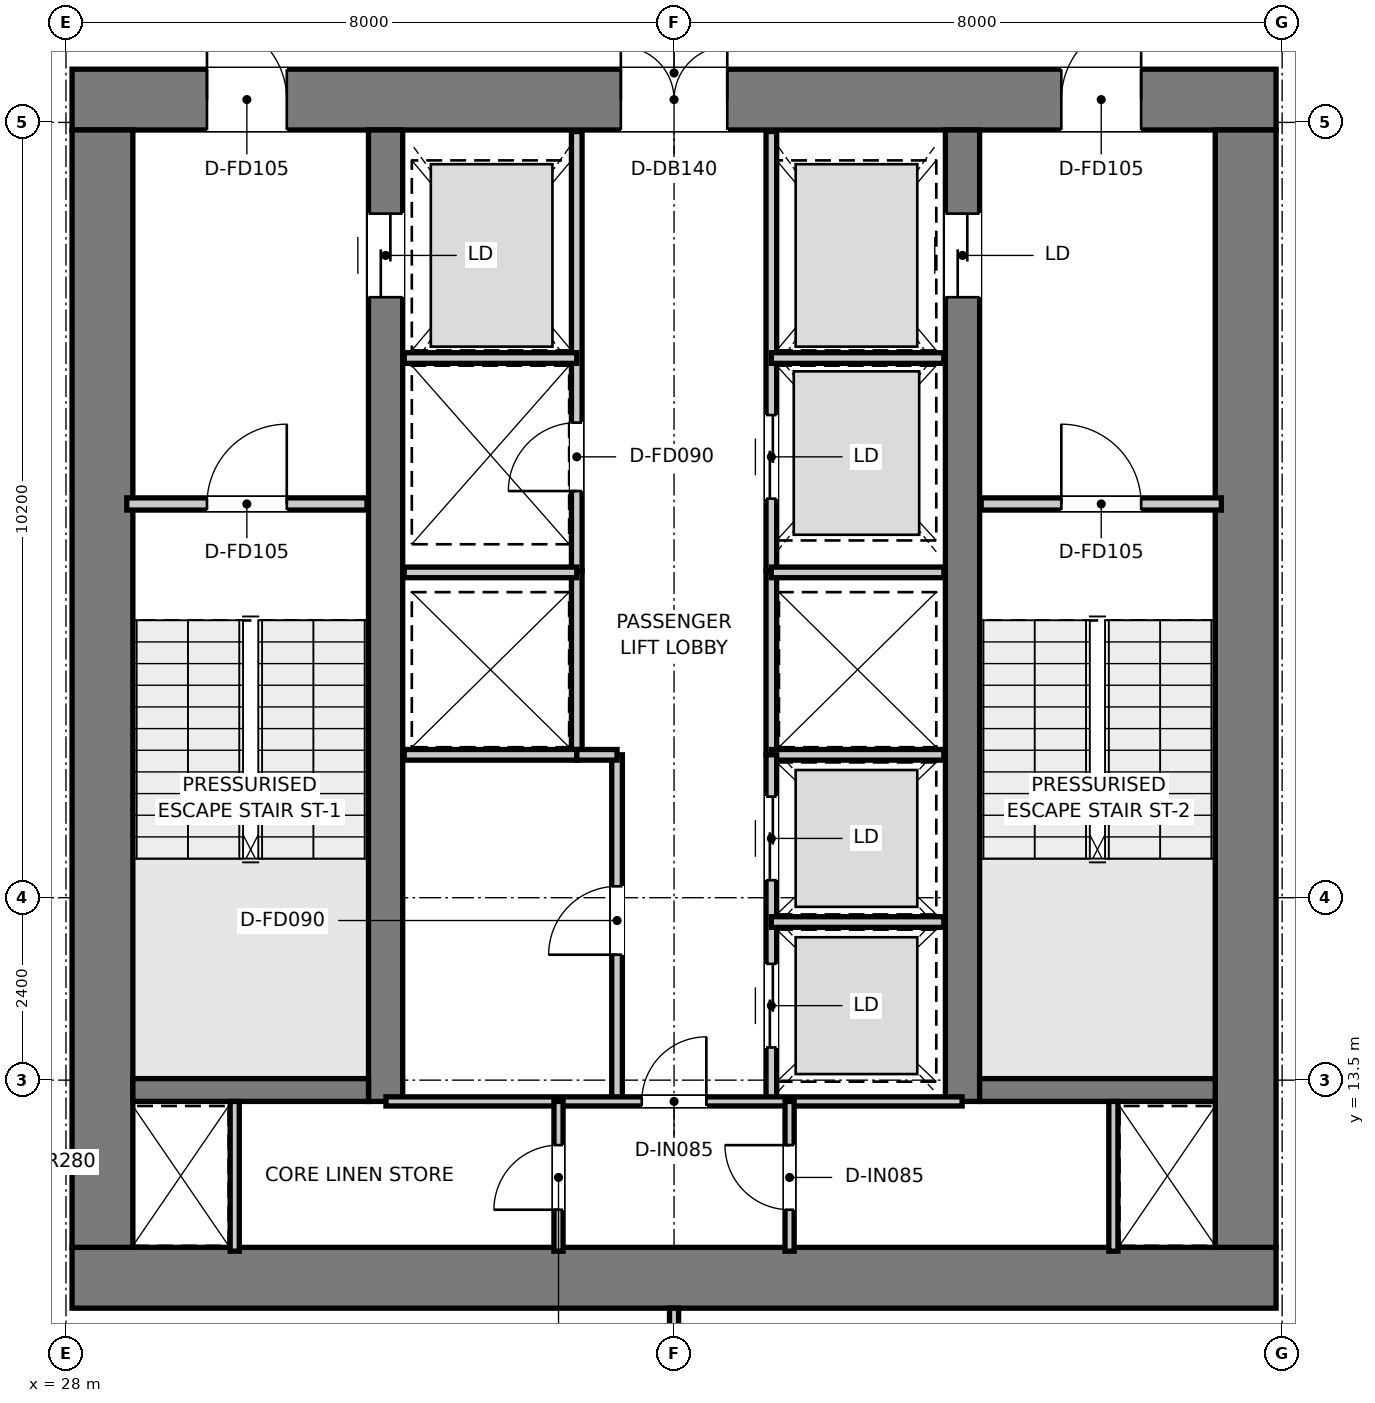
"""IFC4 building model, lengths in metres.
Left out: names, types, materials, properties, quantities, classifications, styles, units other than length and angle.
Written with IfcOpenShell. Run it as: python <this file> out.ifc"""

import sys

from ifc_helpers import new_model, si_unit, direction, frame, frame_2d, origin, place, context, subcontext, project, spatial, rectangle, extrude, element, fill, save


model = new_model("IFC4")
c1 = context("Model", 3, precision=1e-05, world=origin(), true_north=direction((0.0, 1.0)))
c2 = subcontext(c1, "Body", "Model", "MODEL_VIEW")
j1 = project(units=[si_unit("LENGTHUNIT", "METRE"), si_unit("PLANEANGLEUNIT", "RADIAN")], contexts=[c1])
p1 = place(None, origin())
s1 = spatial("IfcSite", under=j1, at=p1, CompositionType="ELEMENT")
p2 = place(p1, origin())
s2 = spatial("IfcBuilding", under=s1, at=p2, CompositionType="ELEMENT")
p3 = place(p2, frame((0.0, 0.0, 238.9)))
s3 = spatial("IfcBuildingStorey", under=s2, at=p3, CompositionType="ELEMENT", Elevation=238.9)
p4 = place(p3, frame((28.08, 10.9, 0.0), z_axis=(0.0, 0.0, 1.0), x_axis=(1.0, 0.0, 0.0)))
e1 = element("IfcWall", 1, at=p4, inside=s3, PredefinedType="SHEAR", context=c2, shape_type="SweptSolid", body=[
    extrude(rectangle(XDim=15.84, YDim=0.8, at=frame_2d((7.92, 0.0))), origin(), (0.0, 0.0, 1.0), 3.95),
])
p5 = place(p3, frame((28.08, 26.4, 0.0), z_axis=(0.0, 0.0, 1.0), x_axis=(1.0, 0.0, 0.0)))
e2 = element("IfcWall", 2, at=p5, inside=s3, PredefinedType="SHEAR", context=c2, shape_type="SweptSolid", body=[
    extrude(rectangle(XDim=15.84, YDim=0.8, at=frame_2d((7.92, 0.0))), origin(), (0.0, 0.0, 1.0), 3.95),
])
p6 = place(p5, frame((7.22, 0.0, 0.0)))
e3 = element("IfcOpeningElement", 3, at=p6, cuts=e2, PredefinedType="OPENING", context=c2, shape_type="SweptSolid", body=[
    extrude(rectangle(XDim=1.4, YDim=2.2, at=frame_2d((0.7, 1.1))), frame((0.0, 0.41, 0.0), z_axis=(0.0, -1.0, 0.0), x_axis=(1.0, 0.0, 0.0)), (0.0, 0.0, 1.0), 0.82),
])
p7 = place(p5, frame((1.775, 0.0, 0.0)))
e4 = element("IfcOpeningElement", 4, at=p7, cuts=e2, PredefinedType="OPENING", context=c2, shape_type="SweptSolid", body=[
    extrude(rectangle(XDim=1.05, YDim=2.1, at=frame_2d((0.525, 1.05))), frame((0.0, 0.41, 0.0), z_axis=(0.0, -1.0, 0.0), x_axis=(1.0, 0.0, 0.0)), (0.0, 0.0, 1.0), 0.82),
])
p8 = place(p5, frame((13.015, 0.0, 0.0)))
e5 = element("IfcOpeningElement", 5, at=p8, cuts=e2, PredefinedType="OPENING", context=c2, shape_type="SweptSolid", body=[
    extrude(rectangle(XDim=1.05, YDim=2.1, at=frame_2d((0.525, 1.05))), frame((0.0, 0.41, 0.0), z_axis=(0.0, -1.0, 0.0), x_axis=(1.0, 0.0, 0.0)), (0.0, 0.0, 1.0), 0.82),
])
for number, where, z_axis, x_axis in (
    (6, (28.48, 11.3, 0.0), (0.0, 0.0, 1.0), (0.0, 1.0, 0.0)),
    (7, (43.52, 11.3, 0.0), (0.0, 0.0, 1.0), (0.0, 1.0, 0.0)),
):
    element("IfcWall", number, at=place(p3, frame(where, z_axis=z_axis, x_axis=x_axis)), inside=s3, PredefinedType="SHEAR", context=c2, shape_type="SweptSolid", body=[
        extrude(rectangle(XDim=14.7, YDim=0.8, at=frame_2d((7.35, 0.0))), origin(), (0.0, 0.0, 1.0), 3.95),
    ])
p9 = place(p3, frame((32.205, 13.22, 0.0), z_axis=(0.0, 0.0, 1.0), x_axis=(0.0, 1.0, 0.0)))
e8 = element("IfcWall", 8, at=p9, inside=s3, PredefinedType="SHEAR", context=c2, shape_type="SweptSolid", body=[
    extrude(rectangle(XDim=12.78, YDim=0.45, at=frame_2d((6.39, 0.0))), origin(), (0.0, 0.0, 1.0), 3.95),
])
p10 = place(p9, frame((10.58, 0.0, 0.0)))
e9 = element("IfcOpeningElement", 9, at=p10, cuts=e8, PredefinedType="OPENING", context=c2, shape_type="SweptSolid", body=[
    extrude(rectangle(XDim=1.1, YDim=2.15, at=frame_2d((0.55, 1.075))), frame((0.0, 0.235, 0.0), z_axis=(0.0, -1.0, 0.0), x_axis=(1.0, 0.0, 0.0)), (0.0, 0.0, 1.0), 0.47),
])
p11 = place(p3, frame((39.795, 13.22, 0.0), z_axis=(0.0, 0.0, 1.0), x_axis=(0.0, 1.0, 0.0)))
e10 = element("IfcWall", 10, at=p11, inside=s3, PredefinedType="SHEAR", context=c2, shape_type="SweptSolid", body=[
    extrude(rectangle(XDim=12.78, YDim=0.45, at=frame_2d((6.39, 0.0))), origin(), (0.0, 0.0, 1.0), 3.95),
])
p12 = place(p11, frame((10.58, 0.0, 0.0)))
e11 = element("IfcOpeningElement", 11, at=p12, cuts=e10, PredefinedType="OPENING", context=c2, shape_type="SweptSolid", body=[
    extrude(rectangle(XDim=1.1, YDim=2.15, at=frame_2d((0.55, 1.075))), frame((0.0, 0.235, 0.0), z_axis=(0.0, -1.0, 0.0), x_axis=(1.0, 0.0, 0.0)), (0.0, 0.0, 1.0), 0.47),
])
for number, where, z_axis, x_axis in (
    (12, (28.88, 13.37, 0.0), (0.0, 0.0, 1.0), (1.0, 0.0, 0.0)),
    (13, (40.02, 13.37, 0.0), (0.0, 0.0, 1.0), (1.0, 0.0, 0.0)),
):
    element("IfcWall", number, at=place(p3, frame(where, z_axis=z_axis, x_axis=x_axis)), inside=s3, PredefinedType="SHEAR", context=c2, shape_type="SweptSolid", body=[
        extrude(rectangle(XDim=3.1, YDim=0.3, at=frame_2d((1.55, 0.0))), origin(), (0.0, 0.0, 1.0), 3.95),
    ])
p13 = place(p3, frame((28.8, 21.08, 0.0), z_axis=(0.0, 0.0, 1.0), x_axis=(1.0, 0.0, 0.0)))
e14 = element("IfcWall", 14, at=p13, inside=s3, PredefinedType="PARTITIONING", context=c2, shape_type="SweptSolid", body=[
    extrude(rectangle(XDim=3.16, YDim=0.16, at=frame_2d((1.58, 0.0))), origin(), (0.0, 0.0, 1.0), 3.67),
])
p14 = place(p13, frame((1.055, 0.0, 0.0)))
e15 = element("IfcOpeningElement", 15, at=p14, cuts=e14, PredefinedType="OPENING", context=c2, shape_type="SweptSolid", body=[
    extrude(rectangle(XDim=1.05, YDim=2.1, at=frame_2d((0.525, 1.05))), frame((0.0, 0.09, 0.0), z_axis=(0.0, -1.0, 0.0), x_axis=(1.0, 0.0, 0.0)), (0.0, 0.0, 1.0), 0.18),
])
p15 = place(p3, frame((40.04, 21.08, 0.0), z_axis=(0.0, 0.0, 1.0), x_axis=(1.0, 0.0, 0.0)))
e16 = element("IfcWall", 16, at=p15, inside=s3, PredefinedType="PARTITIONING", context=c2, shape_type="SweptSolid", body=[
    extrude(rectangle(XDim=3.16, YDim=0.16, at=frame_2d((1.58, 0.0))), origin(), (0.0, 0.0, 1.0), 3.67),
])
p16 = place(p15, frame((1.055, 0.0, 0.0)))
e17 = element("IfcOpeningElement", 17, at=p16, cuts=e16, PredefinedType="OPENING", context=c2, shape_type="SweptSolid", body=[
    extrude(rectangle(XDim=1.05, YDim=2.1, at=frame_2d((0.525, 1.05))), frame((0.0, 0.09, 0.0), z_axis=(0.0, -1.0, 0.0), x_axis=(1.0, 0.0, 0.0)), (0.0, 0.0, 1.0), 0.18),
])
p17 = place(p3, frame((34.72, 20.2, 0.0), z_axis=(0.0, 0.0, 1.0), x_axis=(0.0, 1.0, 0.0)))
e18 = element("IfcWall", 18, at=p17, inside=s3, PredefinedType="PARTITIONING", context=c2, shape_type="SweptSolid", body=[
    extrude(rectangle(XDim=5.78, YDim=0.14, at=frame_2d((2.89, 0.0))), origin(), (0.0, 0.0, 1.0), 2.67),
])
p18 = place(p17, frame((1.05, 0.0, 0.0)))
e19 = element("IfcOpeningElement", 19, at=p18, cuts=e18, PredefinedType="OPENING", context=c2, shape_type="SweptSolid", body=[
    extrude(rectangle(XDim=0.9, YDim=2.1, at=frame_2d((0.45, 1.05))), frame((0.0, 0.08, 0.0), z_axis=(0.0, -1.0, 0.0), x_axis=(1.0, 0.0, 0.0)), (0.0, 0.0, 1.0), 0.16),
])
p19 = place(p3, frame((37.28, 20.2, 0.0), z_axis=(0.0, 0.0, 1.0), x_axis=(0.0, 1.0, 0.0)))
e20 = element("IfcWall", 20, at=p19, inside=s3, PredefinedType="PARTITIONING", context=c2, shape_type="SweptSolid", body=[
    extrude(rectangle(XDim=5.78, YDim=0.14, at=frame_2d((2.89, 0.0))), origin(), (0.0, 0.0, 1.0), 2.67),
])
p20 = place(p19, frame((0.95, 0.0, 0.0)))
e21 = element("IfcOpeningElement", 21, at=p20, cuts=e20, PredefinedType="OPENING", context=c2, shape_type="SweptSolid", body=[
    extrude(rectangle(XDim=1.1, YDim=2.15, at=frame_2d((0.55, 1.075))), frame((0.0, 0.08, 0.0), z_axis=(0.0, -1.0, 0.0), x_axis=(1.0, 0.0, 0.0)), (0.0, 0.0, 1.0), 0.16),
])
for number, where, z_axis, x_axis in (
    (22, (32.45, 23.0, 0.0), (0.0, 0.0, 1.0), (1.0, 0.0, 0.0)),
    (23, (37.28, 23.0, 0.0), (0.0, 0.0, 1.0), (1.0, 0.0, 0.0)),
):
    element("IfcWall", number, at=place(p3, frame(where, z_axis=z_axis, x_axis=x_axis)), inside=s3, PredefinedType="PARTITIONING", context=c2, shape_type="SweptSolid", body=[
        extrude(rectangle(XDim=2.27, YDim=0.14, at=frame_2d((1.135, 0.0))), origin(), (0.0, 0.0, 1.0), 2.67),
    ])
for number, where, z_axis, x_axis in (
    (24, (34.72, 17.78, 0.0), (0.0, 0.0, 1.0), (0.0, 1.0, 0.0)),
    (25, (37.28, 17.78, 0.0), (0.0, 0.0, 1.0), (0.0, 1.0, 0.0)),
):
    element("IfcWall", number, at=place(p3, frame(where, z_axis=z_axis, x_axis=x_axis)), inside=s3, PredefinedType="PARTITIONING", context=c2, shape_type="SweptSolid", body=[
        extrude(rectangle(XDim=2.42, YDim=0.14, at=frame_2d((1.21, 0.0))), origin(), (0.0, 0.0, 1.0), 3.67),
    ])
for number, where, z_axis, x_axis in (
    (26, (32.45, 17.78, 0.0), (0.0, 0.0, 1.0), (1.0, 0.0, 0.0)),
    (27, (32.45, 20.18, 0.0), (0.0, 0.0, 1.0), (1.0, 0.0, 0.0)),
    (28, (37.28, 17.78, 0.0), (0.0, 0.0, 1.0), (1.0, 0.0, 0.0)),
    (29, (37.28, 20.18, 0.0), (0.0, 0.0, 1.0), (1.0, 0.0, 0.0)),
):
    element("IfcWall", number, at=place(p3, frame(where, z_axis=z_axis, x_axis=x_axis)), inside=s3, PredefinedType="PARTITIONING", context=c2, shape_type="SweptSolid", body=[
        extrude(rectangle(XDim=2.27, YDim=0.14, at=frame_2d((1.135, 0.0))), origin(), (0.0, 0.0, 1.0), 3.67),
    ])
p21 = place(p3, frame((35.25, 13.22, 0.0), z_axis=(0.0, 0.0, 1.0), x_axis=(0.0, 1.0, 0.0)))
e30 = element("IfcWall", 30, at=p21, inside=s3, PredefinedType="PARTITIONING", context=c2, shape_type="SweptSolid", body=[
    extrude(rectangle(XDim=4.56, YDim=0.14, at=frame_2d((2.28, 0.0))), origin(), (0.0, 0.0, 1.0), 3.67),
])
p22 = place(p21, frame((1.93, 0.0, 0.0)))
e31 = element("IfcOpeningElement", 31, at=p22, cuts=e30, PredefinedType="OPENING", context=c2, shape_type="SweptSolid", body=[
    extrude(rectangle(XDim=0.9, YDim=2.1, at=frame_2d((0.45, 1.05))), frame((0.0, 0.08, 0.0), z_axis=(0.0, -1.0, 0.0), x_axis=(1.0, 0.0, 0.0)), (0.0, 0.0, 1.0), 0.16),
])
p23 = place(p3, frame((34.72, 17.78, 0.0), z_axis=(0.0, 0.0, 1.0), x_axis=(1.0, 0.0, 0.0)))
e32 = element("IfcWall", 32, at=p23, inside=s3, PredefinedType="PARTITIONING", context=c2, shape_type="SweptSolid", body=[
    extrude(rectangle(XDim=0.53, YDim=0.14, at=frame_2d((0.265, 0.0))), origin(), (0.0, 0.0, 1.0), 3.67),
])
p24 = place(p3, frame((37.28, 13.22, 0.0), z_axis=(0.0, 0.0, 1.0), x_axis=(0.0, 1.0, 0.0)))
e33 = element("IfcWall", 33, at=p24, inside=s3, PredefinedType="PARTITIONING", context=c2, shape_type="SweptSolid", body=[
    extrude(rectangle(XDim=4.56, YDim=0.14, at=frame_2d((2.28, 0.0))), origin(), (0.0, 0.0, 1.0), 3.67),
])
p25 = place(p24, frame((0.71, 0.0, 0.0)))
e34 = element("IfcOpeningElement", 34, at=p25, cuts=e33, PredefinedType="OPENING", context=c2, shape_type="SweptSolid", body=[
    extrude(rectangle(XDim=1.1, YDim=2.15, at=frame_2d((0.55, 1.075))), frame((0.0, 0.08, 0.0), z_axis=(0.0, -1.0, 0.0), x_axis=(1.0, 0.0, 0.0)), (0.0, 0.0, 1.0), 0.16),
])
p26 = place(p24, frame((2.91, 0.0, 0.0)))
e35 = element("IfcOpeningElement", 35, at=p26, cuts=e33, PredefinedType="OPENING", context=c2, shape_type="SweptSolid", body=[
    extrude(rectangle(XDim=1.1, YDim=2.15, at=frame_2d((0.55, 1.075))), frame((0.0, 0.08, 0.0), z_axis=(0.0, -1.0, 0.0), x_axis=(1.0, 0.0, 0.0)), (0.0, 0.0, 1.0), 0.16),
])
p27 = place(p3, frame((37.28, 15.58, 0.0), z_axis=(0.0, 0.0, 1.0), x_axis=(1.0, 0.0, 0.0)))
e36 = element("IfcWall", 36, at=p27, inside=s3, PredefinedType="PARTITIONING", context=c2, shape_type="SweptSolid", body=[
    extrude(rectangle(XDim=2.27, YDim=0.14, at=frame_2d((1.135, 0.0))), origin(), (0.0, 0.0, 1.0), 3.67),
])
for number, where, z_axis, x_axis in (
    (37, (30.22, 11.25, 0.0), (0.0, 0.0, 1.0), (0.0, 1.0, 0.0)),
    (38, (41.78, 11.25, 0.0), (0.0, 0.0, 1.0), (0.0, 1.0, 0.0)),
):
    element("IfcWall", number, at=place(p3, frame(where, z_axis=z_axis, x_axis=x_axis)), inside=s3, PredefinedType="PARTITIONING", context=c2, shape_type="SweptSolid", body=[
        extrude(rectangle(XDim=1.97, YDim=0.12, at=frame_2d((0.985, 0.0))), origin(), (0.0, 0.0, 1.0), 3.67),
    ])
p28 = place(p3, frame((32.21, 13.22, 0.0), z_axis=(0.0, 0.0, 1.0), x_axis=(1.0, 0.0, 0.0)))
e39 = element("IfcWall", 39, at=p28, inside=s3, PredefinedType="PARTITIONING", context=c2, shape_type="SweptSolid", body=[
    extrude(rectangle(XDim=7.58, YDim=0.12, at=frame_2d((3.79, 0.0))), origin(), (0.0, 0.0, 1.0), 3.67),
])
p29 = place(p28, frame((3.365, 0.0, 0.0)))
e40 = element("IfcOpeningElement", 40, at=p29, cuts=e39, PredefinedType="OPENING", context=c2, shape_type="SweptSolid", body=[
    extrude(rectangle(XDim=0.85, YDim=2.1, at=frame_2d((0.425, 1.05))), frame((0.0, 0.07, 0.0), z_axis=(0.0, -1.0, 0.0), x_axis=(1.0, 0.0, 0.0)), (0.0, 0.0, 1.0), 0.14),
])
p30 = place(p3, frame((34.48, 11.25, 0.0), z_axis=(0.0, 0.0, 1.0), x_axis=(0.0, 1.0, 0.0)))
e41 = element("IfcWall", 41, at=p30, inside=s3, PredefinedType="PARTITIONING", context=c2, shape_type="SweptSolid", body=[
    extrude(rectangle(XDim=1.97, YDim=0.12, at=frame_2d((0.985, 0.0))), origin(), (0.0, 0.0, 1.0), 3.67),
])
p31 = place(p30, frame((0.545, 0.0, 0.0)))
e42 = element("IfcOpeningElement", 42, at=p31, cuts=e41, PredefinedType="OPENING", context=c2, shape_type="SweptSolid", body=[
    extrude(rectangle(XDim=0.85, YDim=2.1, at=frame_2d((0.425, 1.05))), frame((0.0, 0.07, 0.0), z_axis=(0.0, -1.0, 0.0), x_axis=(1.0, 0.0, 0.0)), (0.0, 0.0, 1.0), 0.14),
])
p32 = place(p3, frame((37.52, 11.25, 0.0), z_axis=(0.0, 0.0, 1.0), x_axis=(0.0, 1.0, 0.0)))
e43 = element("IfcWall", 43, at=p32, inside=s3, PredefinedType="PARTITIONING", context=c2, shape_type="SweptSolid", body=[
    extrude(rectangle(XDim=1.97, YDim=0.12, at=frame_2d((0.985, 0.0))), origin(), (0.0, 0.0, 1.0), 3.67),
])
p33 = place(p32, frame((0.545, 0.0, 0.0)))
e44 = element("IfcOpeningElement", 44, at=p33, cuts=e43, PredefinedType="OPENING", context=c2, shape_type="SweptSolid", body=[
    extrude(rectangle(XDim=0.85, YDim=2.1, at=frame_2d((0.425, 1.05))), frame((0.0, 0.07, 0.0), z_axis=(0.0, -1.0, 0.0), x_axis=(1.0, 0.0, 0.0)), (0.0, 0.0, 1.0), 0.14),
])
p34 = place(p3, frame((36.0, 4.407, 0.0), z_axis=(0.0, 0.0, 1.0), x_axis=(0.0, 1.0, 0.0)))
e45 = element("IfcWall", 45, at=p34, inside=s3, PredefinedType="PARTITIONING", context=c2, shape_type="SweptSolid", body=[
    extrude(rectangle(XDim=6.093, YDim=0.12, at=frame_2d((3.047, 0.0))), origin(), (0.0, 0.0, 1.0), 3.67),
])
p35 = place(p14, origin())
e46 = element("IfcDoor", 46, at=p35, inside=s3, OperationType="SINGLE_SWING_RIGHT", PredefinedType="DOOR", context=c2, shape_type="SweptSolid", body=[
    extrude(rectangle(XDim=1.05, YDim=2.1, at=frame_2d((0.525, 1.05))), frame((0.0, 0.025, 0.0), z_axis=(0.0, -1.0, 0.0), x_axis=(1.0, 0.0, 0.0)), (0.0, 0.0, 1.0), 0.05),
])
fill(e15, e46)
p36 = place(p16, origin())
e47 = element("IfcDoor", 47, at=p36, inside=s3, OperationType="SINGLE_SWING_LEFT", PredefinedType="DOOR", context=c2, shape_type="SweptSolid", body=[
    extrude(rectangle(XDim=1.05, YDim=2.1, at=frame_2d((0.525, 1.05))), frame((0.0, 0.025, 0.0), z_axis=(0.0, -1.0, 0.0), x_axis=(1.0, 0.0, 0.0)), (0.0, 0.0, 1.0), 0.05),
])
fill(e17, e47)
p37 = place(p6, origin())
e48 = element("IfcDoor", 48, at=p37, inside=s3, OperationType="DOUBLE_DOOR_SINGLE_SWING", PredefinedType="DOOR", context=c2, shape_type="SweptSolid", body=[
    extrude(rectangle(XDim=1.4, YDim=2.2, at=frame_2d((0.7, 1.1))), frame((0.0, 0.025, 0.0), z_axis=(0.0, -1.0, 0.0), x_axis=(1.0, 0.0, 0.0)), (0.0, 0.0, 1.0), 0.05),
])
fill(e3, e48)
p38 = place(p7, origin())
e49 = element("IfcDoor", 49, at=p38, inside=s3, OperationType="SINGLE_SWING_LEFT", PredefinedType="DOOR", context=c2, shape_type="SweptSolid", body=[
    extrude(rectangle(XDim=1.05, YDim=2.1, at=frame_2d((0.525, 1.05))), frame((0.0, 0.025, 0.0), z_axis=(0.0, -1.0, 0.0), x_axis=(1.0, 0.0, 0.0)), (0.0, 0.0, 1.0), 0.05),
])
fill(e4, e49)
p39 = place(p8, origin())
e50 = element("IfcDoor", 50, at=p39, inside=s3, OperationType="SINGLE_SWING_RIGHT", PredefinedType="DOOR", context=c2, shape_type="SweptSolid", body=[
    extrude(rectangle(XDim=1.05, YDim=2.1, at=frame_2d((0.525, 1.05))), frame((0.0, 0.025, 0.0), z_axis=(0.0, -1.0, 0.0), x_axis=(1.0, 0.0, 0.0)), (0.0, 0.0, 1.0), 0.05),
])
fill(e5, e50)
p40 = place(p10, origin())
e51 = element("IfcDoor", 51, at=p40, inside=s3, OperationType="DOUBLE_DOOR_SLIDING", PredefinedType="DOOR", context=c2, shape_type="SweptSolid", body=[
    extrude(rectangle(XDim=1.1, YDim=2.15, at=frame_2d((0.55, 1.075))), frame((0.0, 0.025, 0.0), z_axis=(0.0, -1.0, 0.0), x_axis=(1.0, 0.0, 0.0)), (0.0, 0.0, 1.0), 0.05),
])
fill(e9, e51)
p41 = place(p12, origin())
e52 = element("IfcDoor", 52, at=p41, inside=s3, OperationType="DOUBLE_DOOR_SLIDING", PredefinedType="DOOR", context=c2, shape_type="SweptSolid", body=[
    extrude(rectangle(XDim=1.1, YDim=2.15, at=frame_2d((0.55, 1.075))), frame((0.0, 0.025, 0.0), z_axis=(0.0, -1.0, 0.0), x_axis=(1.0, 0.0, 0.0)), (0.0, 0.0, 1.0), 0.05),
])
fill(e11, e52)
p42 = place(p18, origin())
e53 = element("IfcDoor", 53, at=p42, inside=s3, OperationType="SINGLE_SWING_LEFT", PredefinedType="DOOR", context=c2, shape_type="SweptSolid", body=[
    extrude(rectangle(XDim=0.9, YDim=2.1, at=frame_2d((0.45, 1.05))), frame((0.0, 0.025, 0.0), z_axis=(0.0, -1.0, 0.0), x_axis=(1.0, 0.0, 0.0)), (0.0, 0.0, 1.0), 0.05),
])
fill(e19, e53)
p43 = place(p20, origin())
e54 = element("IfcDoor", 54, at=p43, inside=s3, OperationType="DOUBLE_DOOR_SLIDING", PredefinedType="DOOR", context=c2, shape_type="SweptSolid", body=[
    extrude(rectangle(XDim=1.1, YDim=2.15, at=frame_2d((0.55, 1.075))), frame((0.0, 0.025, 0.0), z_axis=(0.0, -1.0, 0.0), x_axis=(1.0, 0.0, 0.0)), (0.0, 0.0, 1.0), 0.05),
])
fill(e21, e54)
p44 = place(p22, origin())
e55 = element("IfcDoor", 55, at=p44, inside=s3, OperationType="SINGLE_SWING_LEFT", PredefinedType="DOOR", context=c2, shape_type="SweptSolid", body=[
    extrude(rectangle(XDim=0.9, YDim=2.1, at=frame_2d((0.45, 1.05))), frame((0.0, 0.025, 0.0), z_axis=(0.0, -1.0, 0.0), x_axis=(1.0, 0.0, 0.0)), (0.0, 0.0, 1.0), 0.05),
])
fill(e31, e55)
p45 = place(p25, origin())
e56 = element("IfcDoor", 56, at=p45, inside=s3, OperationType="DOUBLE_DOOR_SLIDING", PredefinedType="DOOR", context=c2, shape_type="SweptSolid", body=[
    extrude(rectangle(XDim=1.1, YDim=2.15, at=frame_2d((0.55, 1.075))), frame((0.0, 0.025, 0.0), z_axis=(0.0, -1.0, 0.0), x_axis=(1.0, 0.0, 0.0)), (0.0, 0.0, 1.0), 0.05),
])
fill(e34, e56)
p46 = place(p26, origin())
e57 = element("IfcDoor", 57, at=p46, inside=s3, OperationType="DOUBLE_DOOR_SLIDING", PredefinedType="DOOR", context=c2, shape_type="SweptSolid", body=[
    extrude(rectangle(XDim=1.1, YDim=2.15, at=frame_2d((0.55, 1.075))), frame((0.0, 0.025, 0.0), z_axis=(0.0, -1.0, 0.0), x_axis=(1.0, 0.0, 0.0)), (0.0, 0.0, 1.0), 0.05),
])
fill(e35, e57)
p47 = place(p29, origin())
e58 = element("IfcDoor", 58, at=p47, inside=s3, OperationType="SINGLE_SWING_RIGHT", PredefinedType="DOOR", context=c2, shape_type="SweptSolid", body=[
    extrude(rectangle(XDim=0.85, YDim=2.1, at=frame_2d((0.425, 1.05))), frame((0.0, 0.025, 0.0), z_axis=(0.0, -1.0, 0.0), x_axis=(1.0, 0.0, 0.0)), (0.0, 0.0, 1.0), 0.05),
])
fill(e40, e58)
p48 = place(p31, origin())
e59 = element("IfcDoor", 59, at=p48, inside=s3, OperationType="SINGLE_SWING_LEFT", PredefinedType="DOOR", context=c2, shape_type="SweptSolid", body=[
    extrude(rectangle(XDim=0.85, YDim=2.1, at=frame_2d((0.425, 1.05))), frame((0.0, 0.025, 0.0), z_axis=(0.0, -1.0, 0.0), x_axis=(1.0, 0.0, 0.0)), (0.0, 0.0, 1.0), 0.05),
])
fill(e42, e59)
p49 = place(p33, origin())
e60 = element("IfcDoor", 60, at=p49, inside=s3, OperationType="SINGLE_SWING_RIGHT", PredefinedType="DOOR", context=c2, shape_type="SweptSolid", body=[
    extrude(rectangle(XDim=0.85, YDim=2.1, at=frame_2d((0.425, 1.05))), frame((0.0, 0.025, 0.0), z_axis=(0.0, -1.0, 0.0), x_axis=(1.0, 0.0, 0.0)), (0.0, 0.0, 1.0), 0.05),
])
fill(e44, e60)
save(model, sys.argv[1])
